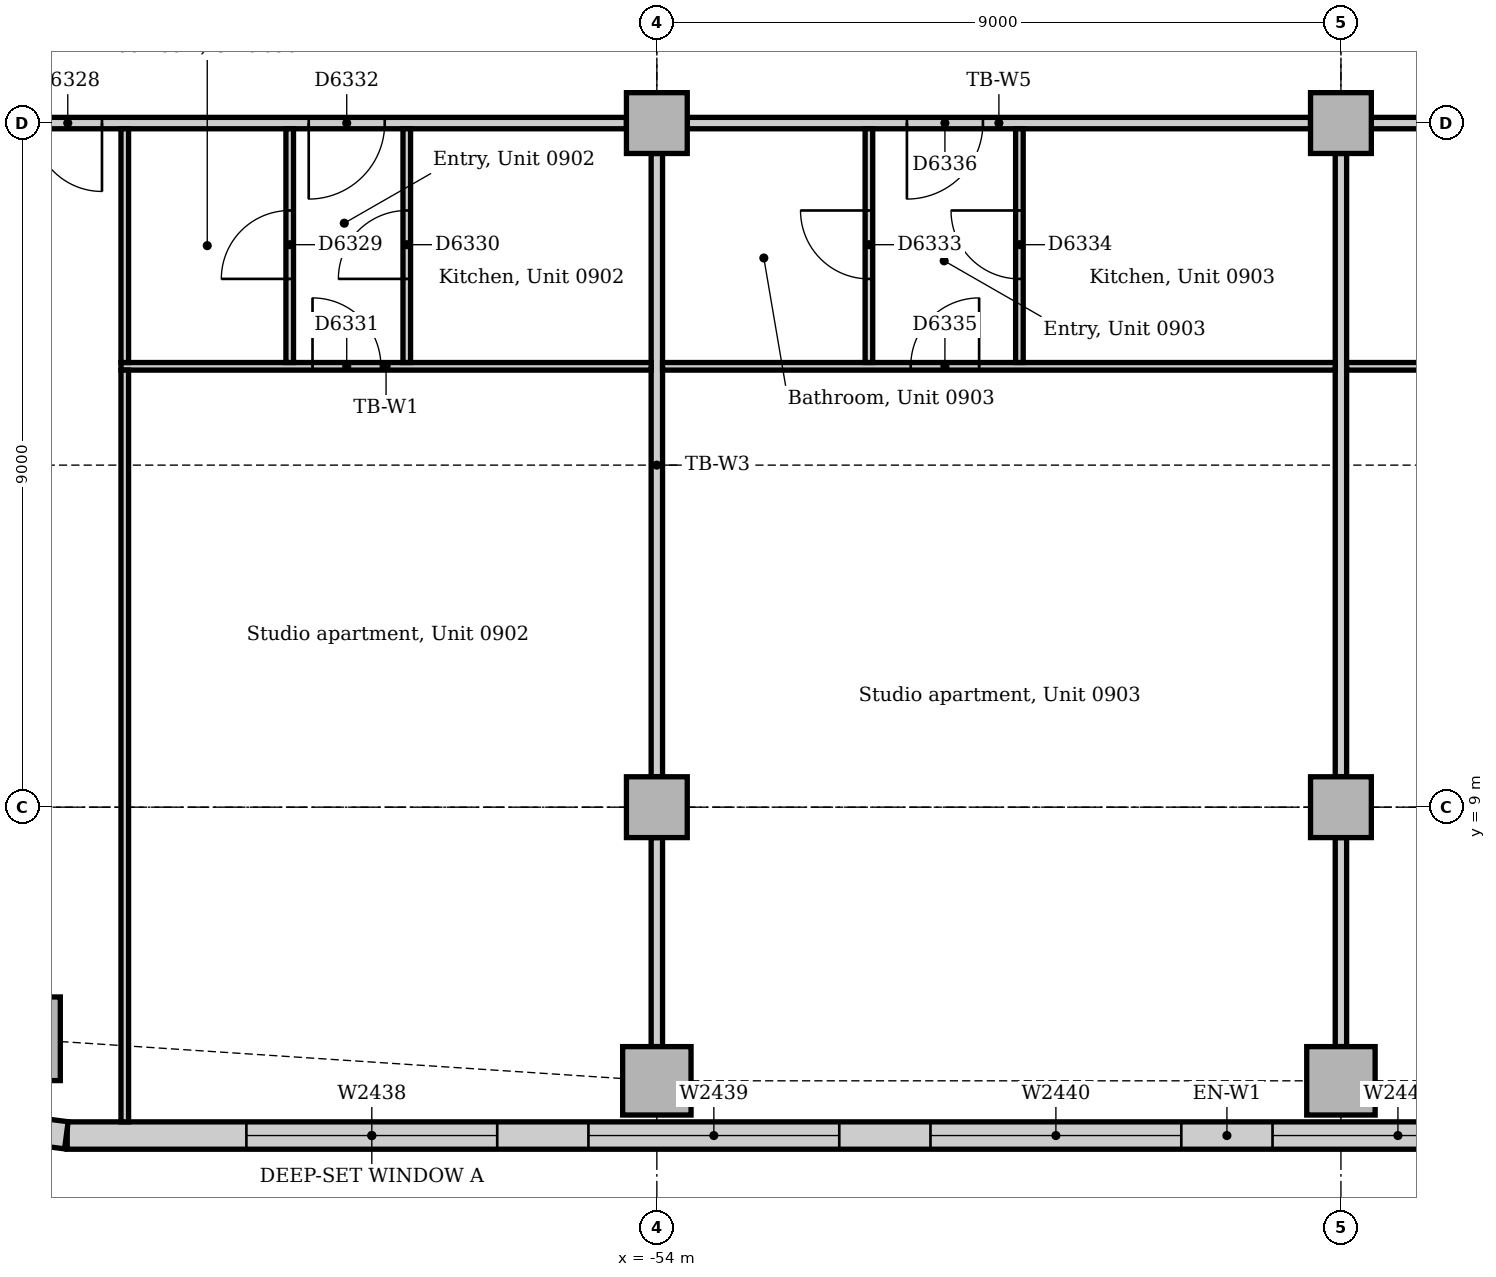
"""IFC4 building model, lengths in metres.
Left out: names, types, materials, properties, quantities, classifications, styles, units other than length and angle.
Written with IfcOpenShell. Run it as: python <this file> out.ifc"""

import sys

from ifc_helpers import new_model, si_unit, direction, frame, frame_2d, origin, origin_2d, place, context, subcontext, project, spatial, rectangle, extrude, element, fill, save


model = new_model("IFC4")
c1 = context("Model", 3, precision=1e-05, world=origin(), true_north=direction((0.0, 1.0)))
c2 = subcontext(c1, "Body", "Model", "MODEL_VIEW")
j1 = project(units=[si_unit("LENGTHUNIT", "METRE"), si_unit("PLANEANGLEUNIT", "RADIAN")], contexts=[c1])
p1 = place(None, origin())
s1 = spatial("IfcSite", under=j1, at=p1, CompositionType="ELEMENT")
p2 = place(p1, origin())
s2 = spatial("IfcBuilding", under=s1, at=p2, CompositionType="ELEMENT")
p3 = place(p2, frame((0.0, 0.0, 42.0)))
s3 = spatial("IfcBuildingStorey", under=s2, at=p3, CompositionType="ELEMENT", Elevation=42.0)
p4 = place(p3, frame((-62.398, 5.953, 0.0), z_axis=(0.0, 0.0, 1.0), x_axis=(1.0, 0.0, 0.0)))
e1 = element("IfcColumn", 1, at=p4, inside=s3, PredefinedType="COLUMN", context=c2, shape_type="SweptSolid", body=[
    extrude(rectangle(XDim=1.1, YDim=1.1, at=origin_2d()), origin(), (0.0, 0.0, 1.0), 3.7),
])
for number, where, z_axis, x_axis in (
    (2, (-54.0, 5.4, 0.0), (0.0, 0.0, 1.0), (1.0, 0.0, 0.0)),
    (3, (-45.0, 5.4, 0.0), (0.0, 0.0, 1.0), (1.0, 0.0, 0.0)),
):
    element("IfcColumn", number, at=place(p3, frame(where, z_axis=z_axis, x_axis=x_axis)), inside=s3, PredefinedType="COLUMN", context=c2, shape_type="SweptSolid", body=[
        extrude(rectangle(XDim=0.9, YDim=0.9, at=origin_2d()), origin(), (0.0, 0.0, 1.0), 3.7),
    ])
for number, where, z_axis, x_axis in (
    (4, (-54.0, 9.0, 0.0), (0.0, 0.0, 1.0), (1.0, 0.0, 0.0)),
    (5, (-54.0, 18.0, 0.0), (0.0, 0.0, 1.0), (1.0, 0.0, 0.0)),
    (6, (-45.0, 9.0, 0.0), (0.0, 0.0, 1.0), (1.0, 0.0, 0.0)),
    (7, (-45.0, 18.0, 0.0), (0.0, 0.0, 1.0), (1.0, 0.0, 0.0)),
):
    element("IfcColumn", number, at=place(p3, frame(where, z_axis=z_axis, x_axis=x_axis)), inside=s3, PredefinedType="COLUMN", context=c2, shape_type="SweptSolid", body=[
        extrude(rectangle(XDim=0.8, YDim=0.8, at=origin_2d()), origin(), (0.0, 0.0, 1.0), 3.7),
    ])
p5 = place(p3, frame((-61.757, 4.68, 0.0), z_axis=(0.0, 0.0, 1.0), x_axis=(1.0, 0.0, 0.0)))
e8 = element("IfcWall", 8, at=p5, inside=s3, PredefinedType="STANDARD", context=c2, shape_type="SweptSolid", body=[
    extrude(rectangle(XDim=30.515, YDim=0.36, at=frame_2d((15.257, 0.0))), origin(), (0.0, 0.0, 1.0), 3.7),
])
p6 = place(p5, frame((2.357, 0.0, 0.9)))
e9 = element("IfcOpeningElement", 9, at=p6, cuts=e8, PredefinedType="OPENING", context=c2, shape_type="SweptSolid", body=[
    extrude(rectangle(XDim=3.3, YDim=1.6, at=frame_2d((1.65, 0.8))), frame((0.0, 0.19, 0.0), z_axis=(0.0, -1.0, 0.0), x_axis=(1.0, 0.0, 0.0)), (0.0, 0.0, 1.0), 0.38),
])
p7 = place(p5, frame((6.857, 0.0, 0.9)))
e10 = element("IfcOpeningElement", 10, at=p7, cuts=e8, PredefinedType="OPENING", context=c2, shape_type="SweptSolid", body=[
    extrude(rectangle(XDim=3.3, YDim=1.6, at=frame_2d((1.65, 0.8))), frame((0.0, 0.19, 0.0), z_axis=(0.0, -1.0, 0.0), x_axis=(1.0, 0.0, 0.0)), (0.0, 0.0, 1.0), 0.38),
])
p8 = place(p5, frame((11.357, 0.0, 0.9)))
e11 = element("IfcOpeningElement", 11, at=p8, cuts=e8, PredefinedType="OPENING", context=c2, shape_type="SweptSolid", body=[
    extrude(rectangle(XDim=3.3, YDim=1.6, at=frame_2d((1.65, 0.8))), frame((0.0, 0.19, 0.0), z_axis=(0.0, -1.0, 0.0), x_axis=(1.0, 0.0, 0.0)), (0.0, 0.0, 1.0), 0.38),
])
p9 = place(p5, frame((15.857, 0.0, 0.9)))
e12 = element("IfcOpeningElement", 12, at=p9, cuts=e8, PredefinedType="OPENING", context=c2, shape_type="SweptSolid", body=[
    extrude(rectangle(XDim=3.3, YDim=1.6, at=frame_2d((1.65, 0.8))), frame((0.0, 0.19, 0.0), z_axis=(0.0, -1.0, 0.0), x_axis=(1.0, 0.0, 0.0)), (0.0, 0.0, 1.0), 0.38),
])
p10 = place(p5, frame((20.357, 0.0, 0.9)))
e13 = element("IfcOpeningElement", 13, at=p10, cuts=e8, PredefinedType="OPENING", context=c2, shape_type="SweptSolid", body=[
    extrude(rectangle(XDim=3.3, YDim=1.6, at=frame_2d((1.65, 0.8))), frame((0.0, 0.19, 0.0), z_axis=(0.0, -1.0, 0.0), x_axis=(1.0, 0.0, 0.0)), (0.0, 0.0, 1.0), 0.38),
])
p11 = place(p5, frame((24.857, 0.0, 0.9)))
e14 = element("IfcOpeningElement", 14, at=p11, cuts=e8, PredefinedType="OPENING", context=c2, shape_type="SweptSolid", body=[
    extrude(rectangle(XDim=3.3, YDim=1.6, at=frame_2d((1.65, 0.8))), frame((0.0, 0.19, 0.0), z_axis=(0.0, -1.0, 0.0), x_axis=(1.0, 0.0, 0.0)), (0.0, 0.0, 1.0), 0.38),
])
p12 = place(p3, frame((-62.476, 4.776, 0.0), z_axis=(0.0, 0.0, 1.0), x_axis=(0.99144092581, -0.13055608231, 0.0)))
e15 = element("IfcWall", 15, at=p12, inside=s3, PredefinedType="STANDARD", context=c2, shape_type="SweptSolid", body=[
    extrude(rectangle(XDim=0.713, YDim=0.36, at=frame_2d((0.356, 0.0))), origin(), (0.0, 0.0, 1.0), 3.7),
])
p13 = place(p3, frame((-44.6, 18.0, 0.0), z_axis=(0.0, 0.0, 1.0), x_axis=(1.0, 0.0, 0.0)))
e16 = element("IfcWall", 16, at=p13, inside=s3, PredefinedType="PARTITIONING", context=c2, shape_type="SweptSolid", body=[
    extrude(rectangle(XDim=8.2, YDim=0.15, at=frame_2d((4.1, 0.0))), origin(), (0.0, 0.0, 1.0), 3.0),
])
p14 = place(p13, frame((3.0, 0.0, 0.0)))
e17 = element("IfcOpeningElement", 17, at=p14, cuts=e16, PredefinedType="OPENING", context=c2, shape_type="SweptSolid", body=[
    extrude(rectangle(XDim=1.0, YDim=2.1, at=frame_2d((0.5, 1.05))), frame((0.0, 0.085, 0.0), z_axis=(0.0, -1.0, 0.0), x_axis=(1.0, 0.0, 0.0)), (0.0, 0.0, 1.0), 0.17),
])
p15 = place(p3, frame((-53.6, 18.0, 0.0), z_axis=(0.0, 0.0, 1.0), x_axis=(1.0, 0.0, 0.0)))
e18 = element("IfcWall", 18, at=p15, inside=s3, PredefinedType="PARTITIONING", context=c2, shape_type="SweptSolid", body=[
    extrude(rectangle(XDim=8.2, YDim=0.15, at=frame_2d((4.1, 0.0))), origin(), (0.0, 0.0, 1.0), 3.0),
])
p16 = place(p15, frame((2.89, 0.0, 0.0)))
e19 = element("IfcOpeningElement", 19, at=p16, cuts=e18, PredefinedType="OPENING", context=c2, shape_type="SweptSolid", body=[
    extrude(rectangle(XDim=1.0, YDim=2.1, at=frame_2d((0.5, 1.05))), frame((0.0, 0.085, 0.0), z_axis=(0.0, -1.0, 0.0), x_axis=(1.0, 0.0, 0.0)), (0.0, 0.0, 1.0), 0.17),
])
p17 = place(p3, frame((-62.6, 18.0, 0.0), z_axis=(0.0, 0.0, 1.0), x_axis=(1.0, 0.0, 0.0)))
e20 = element("IfcWall", 20, at=p17, inside=s3, PredefinedType="PARTITIONING", context=c2, shape_type="SweptSolid", body=[
    extrude(rectangle(XDim=8.2, YDim=0.15, at=frame_2d((4.1, 0.0))), origin(), (0.0, 0.0, 1.0), 3.0),
])
p18 = place(p17, frame((0.4, 0.0, 0.0)))
e21 = element("IfcOpeningElement", 21, at=p18, cuts=e20, PredefinedType="OPENING", context=c2, shape_type="SweptSolid", body=[
    extrude(rectangle(XDim=0.9, YDim=2.1, at=frame_2d((0.45, 1.05))), frame((0.0, 0.085, 0.0), z_axis=(0.0, -1.0, 0.0), x_axis=(1.0, 0.0, 0.0)), (0.0, 0.0, 1.0), 0.17),
])
p19 = place(p17, frame((4.02, 0.0, 0.0)))
e22 = element("IfcOpeningElement", 22, at=p19, cuts=e20, PredefinedType="OPENING", context=c2, shape_type="SweptSolid", body=[
    extrude(rectangle(XDim=1.0, YDim=2.1, at=frame_2d((0.5, 1.05))), frame((0.0, 0.085, 0.0), z_axis=(0.0, -1.0, 0.0), x_axis=(1.0, 0.0, 0.0)), (0.0, 0.0, 1.0), 0.17),
])
p20 = place(p3, frame((-54.0, 9.4, 0.0), z_axis=(0.0, 0.0, 1.0), x_axis=(0.0, 1.0, 0.0)))
e23 = element("IfcWall", 23, at=p20, inside=s3, PredefinedType="PARTITIONING", context=c2, shape_type="SweptSolid", body=[
    extrude(rectangle(XDim=8.2, YDim=0.15, at=frame_2d((4.1, 0.0))), origin(), (0.0, 0.0, 1.0), 3.008),
])
p21 = place(p3, frame((-54.0, 5.85, 0.0), z_axis=(0.0, 0.0, 1.0), x_axis=(0.0, 1.0, 0.0)))
e24 = element("IfcWall", 24, at=p21, inside=s3, PredefinedType="PARTITIONING", context=c2, shape_type="SweptSolid", body=[
    extrude(rectangle(XDim=2.75, YDim=0.15, at=frame_2d((1.375, 0.0))), origin(), (0.0, 0.0, 1.0), 3.502),
])
p22 = place(p3, frame((-45.0, 9.4, 0.0), z_axis=(0.0, 0.0, 1.0), x_axis=(0.0, 1.0, 0.0)))
e25 = element("IfcWall", 25, at=p22, inside=s3, PredefinedType="PARTITIONING", context=c2, shape_type="SweptSolid", body=[
    extrude(rectangle(XDim=8.2, YDim=0.15, at=frame_2d((4.1, 0.0))), origin(), (0.0, 0.0, 1.0), 3.008),
])
p23 = place(p3, frame((-45.0, 5.85, 0.0), z_axis=(0.0, 0.0, 1.0), x_axis=(0.0, 1.0, 0.0)))
e26 = element("IfcWall", 26, at=p23, inside=s3, PredefinedType="PARTITIONING", context=c2, shape_type="SweptSolid", body=[
    extrude(rectangle(XDim=2.75, YDim=0.15, at=frame_2d((1.375, 0.0))), origin(), (0.0, 0.0, 1.0), 3.502),
])
p24 = place(p3, frame((-61.05, 14.8, 0.0), z_axis=(0.0, 0.0, 1.0), x_axis=(1.0, 0.0, 0.0)))
e27 = element("IfcWall", 27, at=p24, inside=s3, PredefinedType="PARTITIONING", context=c2, shape_type="SweptSolid", body=[
    extrude(rectangle(XDim=6.975, YDim=0.1, at=frame_2d((3.487, 0.0))), origin(), (0.0, 0.0, 1.0), 3.7),
])
p25 = place(p24, frame((2.52, 0.0, 0.0)))
e28 = element("IfcOpeningElement", 28, at=p25, cuts=e27, PredefinedType="OPENING", context=c2, shape_type="SweptSolid", body=[
    extrude(rectangle(XDim=0.9, YDim=2.1, at=frame_2d((0.45, 1.05))), frame((0.0, 0.06, 0.0), z_axis=(0.0, -1.0, 0.0), x_axis=(1.0, 0.0, 0.0)), (0.0, 0.0, 1.0), 0.12),
])
p26 = place(p3, frame((-53.925, 14.8, 0.0), z_axis=(0.0, 0.0, 1.0), x_axis=(1.0, 0.0, 0.0)))
e29 = element("IfcWall", 29, at=p26, inside=s3, PredefinedType="PARTITIONING", context=c2, shape_type="SweptSolid", body=[
    extrude(rectangle(XDim=8.85, YDim=0.1, at=frame_2d((4.425, 0.0))), origin(), (0.0, 0.0, 1.0), 3.7),
])
p27 = place(p26, frame((3.265, 0.0, 0.0)))
e30 = element("IfcOpeningElement", 30, at=p27, cuts=e29, PredefinedType="OPENING", context=c2, shape_type="SweptSolid", body=[
    extrude(rectangle(XDim=0.9, YDim=2.1, at=frame_2d((0.45, 1.05))), frame((0.0, 0.06, 0.0), z_axis=(0.0, -1.0, 0.0), x_axis=(1.0, 0.0, 0.0)), (0.0, 0.0, 1.0), 0.12),
])
p28 = place(p3, frame((-44.925, 14.8, 0.0), z_axis=(0.0, 0.0, 1.0), x_axis=(1.0, 0.0, 0.0)))
e31 = element("IfcWall", 31, at=p28, inside=s3, PredefinedType="PARTITIONING", context=c2, shape_type="SweptSolid", body=[
    extrude(rectangle(XDim=8.85, YDim=0.1, at=frame_2d((4.425, 0.0))), origin(), (0.0, 0.0, 1.0), 3.7),
])
p29 = place(p28, frame((3.265, 0.0, 0.0)))
e32 = element("IfcOpeningElement", 32, at=p29, cuts=e31, PredefinedType="OPENING", context=c2, shape_type="SweptSolid", body=[
    extrude(rectangle(XDim=0.9, YDim=2.1, at=frame_2d((0.45, 1.05))), frame((0.0, 0.06, 0.0), z_axis=(0.0, -1.0, 0.0), x_axis=(1.0, 0.0, 0.0)), (0.0, 0.0, 1.0), 0.12),
])
p30 = place(p3, frame((-61.0, 14.85, 0.0), z_axis=(0.0, 0.0, 1.0), x_axis=(0.0, 1.0, 0.0)))
e33 = element("IfcWall", 33, at=p30, inside=s3, PredefinedType="PARTITIONING", context=c2, shape_type="SweptSolid", body=[
    extrude(rectangle(XDim=3.075, YDim=0.1, at=frame_2d((1.538, 0.0))), origin(), (0.0, 0.0, 1.0), 3.7),
])
p31 = place(p3, frame((-61.0, 4.86, 0.0), z_axis=(0.0, 0.0, 1.0), x_axis=(0.0, 1.0, 0.0)))
e34 = element("IfcWall", 34, at=p31, inside=s3, PredefinedType="PARTITIONING", context=c2, shape_type="SweptSolid", body=[
    extrude(rectangle(XDim=9.89, YDim=0.1, at=frame_2d((4.945, 0.0))), origin(), (0.0, 0.0, 1.0), 3.7),
])
p32 = place(p3, frame((-58.83, 14.85, 0.0), z_axis=(0.0, 0.0, 1.0), x_axis=(0.0, 1.0, 0.0)))
e35 = element("IfcWall", 35, at=p32, inside=s3, PredefinedType="PARTITIONING", context=c2, shape_type="SweptSolid", body=[
    extrude(rectangle(XDim=3.075, YDim=0.1, at=frame_2d((1.538, 0.0))), origin(), (0.0, 0.0, 1.0), 3.7),
])
p33 = place(p32, frame((1.1, 0.0, 0.0)))
e36 = element("IfcOpeningElement", 36, at=p33, cuts=e35, PredefinedType="OPENING", context=c2, shape_type="SweptSolid", body=[
    extrude(rectangle(XDim=0.9, YDim=2.1, at=frame_2d((0.45, 1.05))), frame((0.0, 0.06, 0.0), z_axis=(0.0, -1.0, 0.0), x_axis=(1.0, 0.0, 0.0)), (0.0, 0.0, 1.0), 0.12),
])
p34 = place(p3, frame((-57.29, 14.85, 0.0), z_axis=(0.0, 0.0, 1.0), x_axis=(0.0, 1.0, 0.0)))
e37 = element("IfcWall", 37, at=p34, inside=s3, PredefinedType="PARTITIONING", context=c2, shape_type="SweptSolid", body=[
    extrude(rectangle(XDim=3.075, YDim=0.1, at=frame_2d((1.538, 0.0))), origin(), (0.0, 0.0, 1.0), 3.7),
])
p35 = place(p34, frame((1.1, 0.0, 0.0)))
e38 = element("IfcOpeningElement", 38, at=p35, cuts=e37, PredefinedType="OPENING", context=c2, shape_type="SweptSolid", body=[
    extrude(rectangle(XDim=0.9, YDim=2.1, at=frame_2d((0.45, 1.05))), frame((0.0, 0.06, 0.0), z_axis=(0.0, -1.0, 0.0), x_axis=(1.0, 0.0, 0.0)), (0.0, 0.0, 1.0), 0.12),
])
p36 = place(p3, frame((-51.21, 14.85, 0.0), z_axis=(0.0, 0.0, 1.0), x_axis=(0.0, 1.0, 0.0)))
e39 = element("IfcWall", 39, at=p36, inside=s3, PredefinedType="PARTITIONING", context=c2, shape_type="SweptSolid", body=[
    extrude(rectangle(XDim=3.075, YDim=0.1, at=frame_2d((1.538, 0.0))), origin(), (0.0, 0.0, 1.0), 3.7),
])
p37 = place(p36, frame((1.1, 0.0, 0.0)))
e40 = element("IfcOpeningElement", 40, at=p37, cuts=e39, PredefinedType="OPENING", context=c2, shape_type="SweptSolid", body=[
    extrude(rectangle(XDim=0.9, YDim=2.1, at=frame_2d((0.45, 1.05))), frame((0.0, 0.06, 0.0), z_axis=(0.0, -1.0, 0.0), x_axis=(1.0, 0.0, 0.0)), (0.0, 0.0, 1.0), 0.12),
])
p38 = place(p3, frame((-49.23, 14.85, 0.0), z_axis=(0.0, 0.0, 1.0), x_axis=(0.0, 1.0, 0.0)))
e41 = element("IfcWall", 41, at=p38, inside=s3, PredefinedType="PARTITIONING", context=c2, shape_type="SweptSolid", body=[
    extrude(rectangle(XDim=3.075, YDim=0.1, at=frame_2d((1.538, 0.0))), origin(), (0.0, 0.0, 1.0), 3.7),
])
p39 = place(p38, frame((1.1, 0.0, 0.0)))
e42 = element("IfcOpeningElement", 42, at=p39, cuts=e41, PredefinedType="OPENING", context=c2, shape_type="SweptSolid", body=[
    extrude(rectangle(XDim=0.9, YDim=2.1, at=frame_2d((0.45, 1.05))), frame((0.0, 0.06, 0.0), z_axis=(0.0, -1.0, 0.0), x_axis=(1.0, 0.0, 0.0)), (0.0, 0.0, 1.0), 0.12),
])
p40 = place(p6, origin())
e43 = element("IfcWindow", 43, at=p40, inside=s3, PartitioningType="SINGLE_PANEL", PredefinedType="WINDOW", context=c2, shape_type="SweptSolid", body=[
    extrude(rectangle(XDim=3.3, YDim=1.6, at=frame_2d((1.65, 0.8))), frame((0.0, 0.13, 0.0), z_axis=(0.0, -1.0, 0.0), x_axis=(1.0, 0.0, 0.0)), (0.0, 0.0, 1.0), 0.06),
])
fill(e9, e43)
p41 = place(p7, origin())
e44 = element("IfcWindow", 44, at=p41, inside=s3, PartitioningType="SINGLE_PANEL", PredefinedType="WINDOW", context=c2, shape_type="SweptSolid", body=[
    extrude(rectangle(XDim=3.3, YDim=1.6, at=frame_2d((1.65, 0.8))), frame((0.0, 0.13, 0.0), z_axis=(0.0, -1.0, 0.0), x_axis=(1.0, 0.0, 0.0)), (0.0, 0.0, 1.0), 0.06),
])
fill(e10, e44)
p42 = place(p8, origin())
e45 = element("IfcWindow", 45, at=p42, inside=s3, PartitioningType="SINGLE_PANEL", PredefinedType="WINDOW", context=c2, shape_type="SweptSolid", body=[
    extrude(rectangle(XDim=3.3, YDim=1.6, at=frame_2d((1.65, 0.8))), frame((0.0, 0.13, 0.0), z_axis=(0.0, -1.0, 0.0), x_axis=(1.0, 0.0, 0.0)), (0.0, 0.0, 1.0), 0.06),
])
fill(e11, e45)
p43 = place(p9, origin())
e46 = element("IfcWindow", 46, at=p43, inside=s3, PartitioningType="SINGLE_PANEL", PredefinedType="WINDOW", context=c2, shape_type="SweptSolid", body=[
    extrude(rectangle(XDim=3.3, YDim=1.6, at=frame_2d((1.65, 0.8))), frame((0.0, 0.13, 0.0), z_axis=(0.0, -1.0, 0.0), x_axis=(1.0, 0.0, 0.0)), (0.0, 0.0, 1.0), 0.06),
])
fill(e12, e46)
p44 = place(p18, frame((0.9, 0.0, 0.0), z_axis=(0.0, 0.0, 1.0), x_axis=(-1.0, 0.0, 0.0)))
e47 = element("IfcDoor", 47, at=p44, inside=s3, OperationType="SINGLE_SWING_LEFT", PredefinedType="DOOR", context=c2, shape_type="SweptSolid", body=[
    extrude(rectangle(XDim=0.9, YDim=2.1, at=frame_2d((0.45, 1.05))), frame((0.0, 0.025, 0.0), z_axis=(0.0, -1.0, 0.0), x_axis=(1.0, 0.0, 0.0)), (0.0, 0.0, 1.0), 0.05),
])
fill(e21, e47)
p45 = place(p33, origin())
e48 = element("IfcDoor", 48, at=p45, inside=s3, OperationType="SINGLE_SWING_LEFT", PredefinedType="DOOR", context=c2, shape_type="SweptSolid", body=[
    extrude(rectangle(XDim=0.9, YDim=2.1, at=frame_2d((0.45, 1.05))), frame((0.0, 0.025, 0.0), z_axis=(0.0, -1.0, 0.0), x_axis=(1.0, 0.0, 0.0)), (0.0, 0.0, 1.0), 0.05),
])
fill(e36, e48)
p46 = place(p35, origin())
e49 = element("IfcDoor", 49, at=p46, inside=s3, OperationType="SINGLE_SWING_LEFT", PredefinedType="DOOR", context=c2, shape_type="SweptSolid", body=[
    extrude(rectangle(XDim=0.9, YDim=2.1, at=frame_2d((0.45, 1.05))), frame((0.0, 0.025, 0.0), z_axis=(0.0, -1.0, 0.0), x_axis=(1.0, 0.0, 0.0)), (0.0, 0.0, 1.0), 0.05),
])
fill(e38, e49)
p47 = place(p25, origin())
e50 = element("IfcDoor", 50, at=p47, inside=s3, OperationType="SINGLE_SWING_LEFT", PredefinedType="DOOR", context=c2, shape_type="SweptSolid", body=[
    extrude(rectangle(XDim=0.9, YDim=2.1, at=frame_2d((0.45, 1.05))), frame((0.0, 0.025, 0.0), z_axis=(0.0, -1.0, 0.0), x_axis=(1.0, 0.0, 0.0)), (0.0, 0.0, 1.0), 0.05),
])
fill(e28, e50)
p48 = place(p19, frame((1.0, 0.0, 0.0), z_axis=(0.0, 0.0, 1.0), x_axis=(-1.0, 0.0, 0.0)))
e51 = element("IfcDoor", 51, at=p48, inside=s3, OperationType="SINGLE_SWING_RIGHT", PredefinedType="DOOR", context=c2, shape_type="SweptSolid", body=[
    extrude(rectangle(XDim=1.0, YDim=2.1, at=frame_2d((0.5, 1.05))), frame((0.0, 0.025, 0.0), z_axis=(0.0, -1.0, 0.0), x_axis=(1.0, 0.0, 0.0)), (0.0, 0.0, 1.0), 0.05),
])
fill(e22, e51)
p49 = place(p37, origin())
e52 = element("IfcDoor", 52, at=p49, inside=s3, OperationType="SINGLE_SWING_RIGHT", PredefinedType="DOOR", context=c2, shape_type="SweptSolid", body=[
    extrude(rectangle(XDim=0.9, YDim=2.1, at=frame_2d((0.45, 1.05))), frame((0.0, 0.025, 0.0), z_axis=(0.0, -1.0, 0.0), x_axis=(1.0, 0.0, 0.0)), (0.0, 0.0, 1.0), 0.05),
])
fill(e40, e52)
p50 = place(p39, origin())
e53 = element("IfcDoor", 53, at=p50, inside=s3, OperationType="SINGLE_SWING_RIGHT", PredefinedType="DOOR", context=c2, shape_type="SweptSolid", body=[
    extrude(rectangle(XDim=0.9, YDim=2.1, at=frame_2d((0.45, 1.05))), frame((0.0, 0.025, 0.0), z_axis=(0.0, -1.0, 0.0), x_axis=(1.0, 0.0, 0.0)), (0.0, 0.0, 1.0), 0.05),
])
fill(e42, e53)
p51 = place(p27, origin())
e54 = element("IfcDoor", 54, at=p51, inside=s3, OperationType="SINGLE_SWING_RIGHT", PredefinedType="DOOR", context=c2, shape_type="SweptSolid", body=[
    extrude(rectangle(XDim=0.9, YDim=2.1, at=frame_2d((0.45, 1.05))), frame((0.0, 0.025, 0.0), z_axis=(0.0, -1.0, 0.0), x_axis=(1.0, 0.0, 0.0)), (0.0, 0.0, 1.0), 0.05),
])
fill(e30, e54)
p52 = place(p16, frame((1.0, 0.0, 0.0), z_axis=(0.0, 0.0, 1.0), x_axis=(-1.0, 0.0, 0.0)))
e55 = element("IfcDoor", 55, at=p52, inside=s3, OperationType="SINGLE_SWING_RIGHT", PredefinedType="DOOR", context=c2, shape_type="SweptSolid", body=[
    extrude(rectangle(XDim=1.0, YDim=2.1, at=frame_2d((0.5, 1.05))), frame((0.0, 0.025, 0.0), z_axis=(0.0, -1.0, 0.0), x_axis=(1.0, 0.0, 0.0)), (0.0, 0.0, 1.0), 0.05),
])
fill(e19, e55)
save(model, sys.argv[1])
